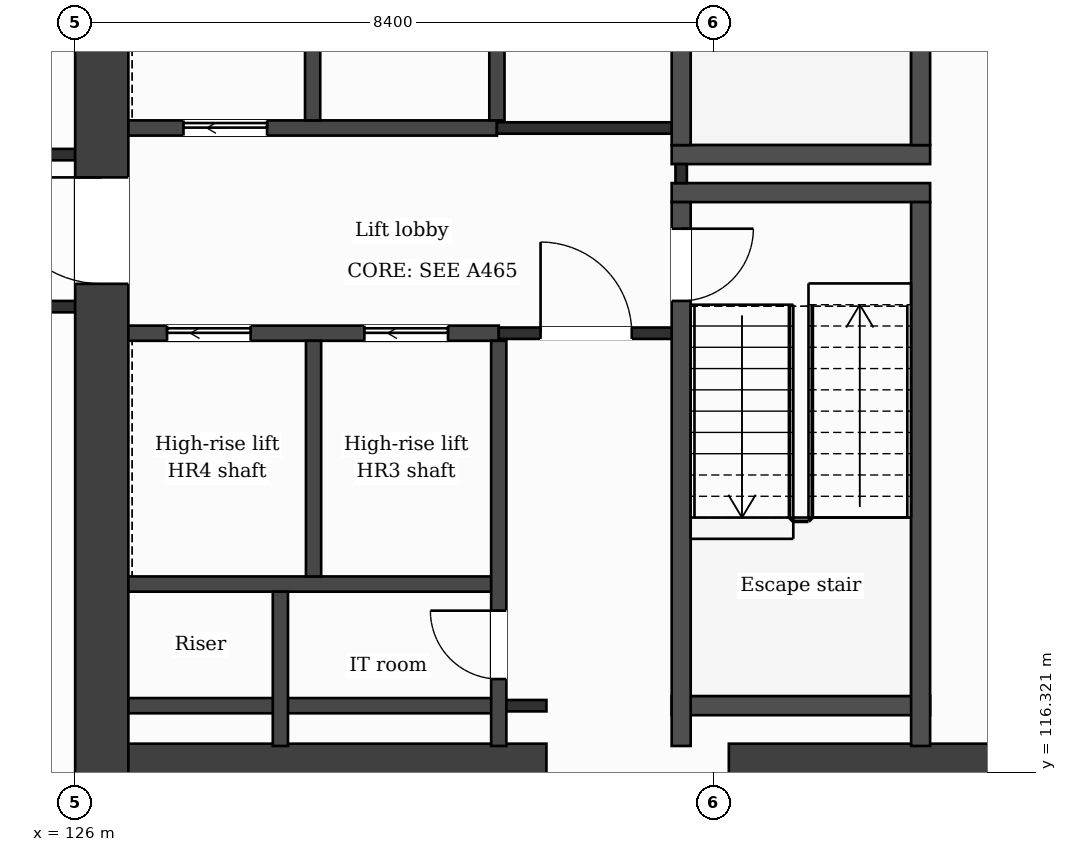
"""IFC4 building model, lengths in metres.
Left out: names, types, materials, properties, quantities, classifications, styles, units other than length and angle.
Written with IfcOpenShell. Run it as: python <this file> out.ifc"""

import sys

from ifc_helpers import new_model, si_unit, direction, frame, frame_2d, origin, place, context, subcontext, project, spatial, rectangle, extrude, element, fill, save


model = new_model("IFC4")
c1 = context("Model", 3, precision=1e-05, world=origin(), true_north=direction((0.0, 1.0)))
c2 = subcontext(c1, "Body", "Model", "MODEL_VIEW")
j1 = project(units=[si_unit("LENGTHUNIT", "METRE"), si_unit("PLANEANGLEUNIT", "RADIAN")], contexts=[c1])
p1 = place(None, origin())
s1 = spatial("IfcSite", under=j1, at=p1, CompositionType="ELEMENT")
p2 = place(p1, origin())
s2 = spatial("IfcBuilding", under=s1, at=p2, CompositionType="ELEMENT")
p3 = place(p2, frame((0.0, 0.0, 266.4)))
s3 = spatial("IfcBuildingStorey", under=s2, at=p3, CompositionType="ELEMENT", Elevation=266.4)
p4 = place(p3, frame((137.863, 132.05, 0.0), z_axis=(0.0, 0.0, 1.0), x_axis=(0.133406218907, -0.991061441464, 0.0)))
e1 = element("IfcWall", 1, at=p4, inside=s3, PredefinedType="SHEAR", context=c2, shape_type="SweptSolid", body=[
    extrude(rectangle(XDim=21.492, YDim=0.7, at=frame_2d((10.746, 0.0))), origin(), (0.0, 0.0, 1.0), 3.7),
])
p5 = place(p3, frame((126.35, 110.75, 0.0), z_axis=(0.0, 0.0, 1.0), x_axis=(0.0, 1.0, 0.0)))
e2 = element("IfcWall", 2, at=p5, inside=s3, PredefinedType="SHEAR", context=c2, shape_type="SweptSolid", body=[
    extrude(rectangle(XDim=21.3, YDim=0.7, at=frame_2d((10.65, 0.0))), origin(), (0.0, 0.0, 1.0), 3.7),
])
p6 = place(p5, frame((12.0, 0.0, 0.0)))
e3 = element("IfcOpeningElement", 3, at=p6, cuts=e2, PredefinedType="OPENING", context=c2, shape_type="SweptSolid", body=[
    extrude(rectangle(XDim=1.4, YDim=2.1, at=frame_2d((0.7, 1.05))), frame((0.0, 0.36, 0.0), z_axis=(0.0, -1.0, 0.0), x_axis=(1.0, 0.0, 0.0)), (0.0, 0.0, 1.0), 0.72),
])
p7 = place(p3, frame((126.7, 116.35, 0.0), z_axis=(0.0, 0.0, 1.0), x_axis=(1.0, 0.0, 0.0)))
e4 = element("IfcWall", 4, at=p7, inside=s3, PredefinedType="SHEAR", context=c2, shape_type="SweptSolid", body=[
    extrude(rectangle(XDim=5.5, YDim=0.7, at=frame_2d((2.75, 0.0))), origin(), (0.0, 0.0, 1.0), 3.7),
])
p8 = place(p3, frame((134.6, 116.35, 0.0), z_axis=(0.0, 0.0, 1.0), x_axis=(1.0, 0.0, 0.0)))
e5 = element("IfcWall", 5, at=p8, inside=s3, PredefinedType="SHEAR", context=c2, shape_type="SweptSolid", body=[
    extrude(rectangle(XDim=5.077, YDim=0.7, at=frame_2d((2.539, 0.0))), origin(), (0.0, 0.0, 1.0), 3.7),
])
p9 = place(p3, frame((126.7, 117.2, 0.0), z_axis=(0.0, 0.0, 1.0), x_axis=(1.0, 0.0, 0.0)))
e6 = element("IfcWall", 6, at=p9, inside=s3, PredefinedType="PARTITIONING", context=c2, shape_type="SweptSolid", body=[
    extrude(rectangle(XDim=4.873, YDim=0.2, at=frame_2d((2.437, 0.0))), origin(), (0.0, 0.0, 1.0), 3.38),
])
p10 = place(p3, frame((131.573, 117.2, 0.0), z_axis=(0.0, 0.0, 1.0), x_axis=(1.0, 0.0, 0.0)))
e7 = element("IfcWall", 7, at=p10, inside=s3, PredefinedType="PARTITIONING", context=c2, shape_type="SweptSolid", body=[
    extrude(rectangle(XDim=0.627, YDim=0.15, at=frame_2d((0.313, 0.0))), origin(), (0.0, 0.0, 1.0), 3.38),
])
p11 = place(p3, frame((133.848, 117.2, 0.0), z_axis=(0.0, 0.0, 1.0), x_axis=(1.0, 0.0, 0.0)))
e8 = element("IfcWall", 8, at=p11, inside=s3, PredefinedType="PARTITIONING", context=c2, shape_type="SweptSolid", body=[
    extrude(rectangle(XDim=3.4, YDim=0.25, at=frame_2d((1.7, 0.0))), origin(), (0.0, 0.0, 1.0), 3.38),
])
p12 = place(p3, frame((126.7, 118.8, 0.0), z_axis=(0.0, 0.0, 1.0), x_axis=(1.0, 0.0, 0.0)))
e9 = element("IfcWall", 9, at=p12, inside=s3, PredefinedType="PARTITIONING", context=c2, shape_type="SweptSolid", body=[
    extrude(rectangle(XDim=4.873, YDim=0.2, at=frame_2d((2.437, 0.0))), origin(), (0.0, 0.0, 1.0), 3.38),
])
p13 = place(p3, frame((126.7, 122.1, 0.0), z_axis=(0.0, 0.0, 1.0), x_axis=(1.0, 0.0, 0.0)))
e10 = element("IfcWall", 10, at=p13, inside=s3, PredefinedType="PARTITIONING", context=c2, shape_type="SweptSolid", body=[
    extrude(rectangle(XDim=4.873, YDim=0.2, at=frame_2d((2.437, 0.0))), origin(), (0.0, 0.0, 1.0), 3.38),
])
p14 = place(p13, frame((3.105, 0.0, 0.0)))
e11 = element("IfcOpeningElement", 11, at=p14, cuts=e10, PredefinedType="OPENING", context=c2, shape_type="SweptSolid", body=[
    extrude(rectangle(XDim=1.1, YDim=2.1, at=frame_2d((0.55, 1.05))), frame((0.0, 0.11, 0.0), z_axis=(0.0, -1.0, 0.0), x_axis=(1.0, 0.0, 0.0)), (0.0, 0.0, 1.0), 0.22),
])
p15 = place(p13, frame((0.509, 0.0, 0.0)))
e12 = element("IfcOpeningElement", 12, at=p15, cuts=e10, PredefinedType="OPENING", context=c2, shape_type="SweptSolid", body=[
    extrude(rectangle(XDim=1.1, YDim=2.1, at=frame_2d((0.55, 1.05))), frame((0.0, 0.11, 0.0), z_axis=(0.0, -1.0, 0.0), x_axis=(1.0, 0.0, 0.0)), (0.0, 0.0, 1.0), 0.22),
])
p16 = place(p3, frame((131.573, 122.1, 0.0), z_axis=(0.0, 0.0, 1.0), x_axis=(1.0, 0.0, 0.0)))
e13 = element("IfcWall", 13, at=p16, inside=s3, PredefinedType="PARTITIONING", context=c2, shape_type="SweptSolid", body=[
    extrude(rectangle(XDim=2.4, YDim=0.15, at=frame_2d((1.2, 0.0))), origin(), (0.0, 0.0, 1.0), 3.38),
])
p17 = place(p16, frame((0.55, 0.0, 0.0)))
e14 = element("IfcOpeningElement", 14, at=p17, cuts=e13, PredefinedType="OPENING", context=c2, shape_type="SweptSolid", body=[
    extrude(rectangle(XDim=1.2, YDim=2.1, at=frame_2d((0.6, 1.05))), frame((0.0, 0.085, 0.0), z_axis=(0.0, -1.0, 0.0), x_axis=(1.0, 0.0, 0.0)), (0.0, 0.0, 1.0), 0.17),
])
p18 = place(p3, frame((100.8, 122.45, 0.0), z_axis=(0.0, 0.0, 1.0), x_axis=(1.0, 0.0, 0.0)))
e15 = element("IfcWall", 15, at=p18, inside=s3, PredefinedType="PARTITIONING", context=c2, shape_type="SweptSolid", body=[
    extrude(rectangle(XDim=25.2, YDim=0.15, at=frame_2d((12.6, 0.0))), origin(), (0.0, 0.0, 1.0), 3.38),
])
p19 = place(p18, frame((5.55, 0.0, 0.0)))
e16 = element("IfcOpeningElement", 16, at=p19, cuts=e15, PredefinedType="OPENING", context=c2, shape_type="SweptSolid", body=[
    extrude(rectangle(XDim=1.0, YDim=2.1, at=frame_2d((0.5, 1.05))), frame((0.0, 0.085, 0.0), z_axis=(0.0, -1.0, 0.0), x_axis=(1.0, 0.0, 0.0)), (0.0, 0.0, 1.0), 0.17),
])
p20 = place(p18, frame((8.65, 0.0, 0.0)))
e17 = element("IfcOpeningElement", 17, at=p20, cuts=e15, PredefinedType="OPENING", context=c2, shape_type="SweptSolid", body=[
    extrude(rectangle(XDim=1.0, YDim=2.1, at=frame_2d((0.5, 1.05))), frame((0.0, 0.085, 0.0), z_axis=(0.0, -1.0, 0.0), x_axis=(1.0, 0.0, 0.0)), (0.0, 0.0, 1.0), 0.17),
])
p21 = place(p18, frame((19.83, 0.0, 0.0)))
e18 = element("IfcOpeningElement", 18, at=p21, cuts=e15, PredefinedType="OPENING", context=c2, shape_type="SweptSolid", body=[
    extrude(rectangle(XDim=1.0, YDim=2.1, at=frame_2d((0.5, 1.05))), frame((0.0, 0.085, 0.0), z_axis=(0.0, -1.0, 0.0), x_axis=(1.0, 0.0, 0.0)), (0.0, 0.0, 1.0), 0.17),
])
for number, where, z_axis, x_axis in (
    (19, (133.848, 123.95, 0.0), (0.0, 0.0, 1.0), (1.0, 0.0, 0.0)),
    (20, (133.848, 124.45, 0.0), (0.0, 0.0, 1.0), (1.0, 0.0, 0.0)),
):
    element("IfcWall", number, at=place(p3, frame(where, z_axis=z_axis, x_axis=x_axis)), inside=s3, PredefinedType="PARTITIONING", context=c2, shape_type="SweptSolid", body=[
        extrude(rectangle(XDim=3.4, YDim=0.25, at=frame_2d((1.7, 0.0))), origin(), (0.0, 0.0, 1.0), 3.38),
    ])
p22 = place(p3, frame((100.8, 124.45, 0.0), z_axis=(0.0, 0.0, 1.0), x_axis=(1.0, 0.0, 0.0)))
e21 = element("IfcWall", 21, at=p22, inside=s3, PredefinedType="PARTITIONING", context=c2, shape_type="SweptSolid", body=[
    extrude(rectangle(XDim=25.2, YDim=0.15, at=frame_2d((12.6, 0.0))), origin(), (0.0, 0.0, 1.0), 3.38),
])
p23 = place(p22, frame((0.975, 0.0, 0.0)))
e22 = element("IfcOpeningElement", 22, at=p23, cuts=e21, PredefinedType="OPENING", context=c2, shape_type="SweptSolid", body=[
    extrude(rectangle(XDim=1.0, YDim=2.1, at=frame_2d((0.5, 1.05))), frame((0.0, 0.085, 0.0), z_axis=(0.0, -1.0, 0.0), x_axis=(1.0, 0.0, 0.0)), (0.0, 0.0, 1.0), 0.17),
])
p24 = place(p22, frame((5.175, 0.0, 0.0)))
e23 = element("IfcOpeningElement", 23, at=p24, cuts=e21, PredefinedType="OPENING", context=c2, shape_type="SweptSolid", body=[
    extrude(rectangle(XDim=1.0, YDim=2.1, at=frame_2d((0.5, 1.05))), frame((0.0, 0.085, 0.0), z_axis=(0.0, -1.0, 0.0), x_axis=(1.0, 0.0, 0.0)), (0.0, 0.0, 1.0), 0.17),
])
p25 = place(p22, frame((13.775, 0.0, 0.0)))
e24 = element("IfcOpeningElement", 24, at=p25, cuts=e21, PredefinedType="OPENING", context=c2, shape_type="SweptSolid", body=[
    extrude(rectangle(XDim=1.0, YDim=2.1, at=frame_2d((0.5, 1.05))), frame((0.0, 0.085, 0.0), z_axis=(0.0, -1.0, 0.0), x_axis=(1.0, 0.0, 0.0)), (0.0, 0.0, 1.0), 0.17),
])
p26 = place(p22, frame((17.67, 0.0, 0.0)))
e25 = element("IfcOpeningElement", 25, at=p26, cuts=e21, PredefinedType="OPENING", context=c2, shape_type="SweptSolid", body=[
    extrude(rectangle(XDim=1.0, YDim=2.1, at=frame_2d((0.5, 1.05))), frame((0.0, 0.085, 0.0), z_axis=(0.0, -1.0, 0.0), x_axis=(1.0, 0.0, 0.0)), (0.0, 0.0, 1.0), 0.17),
])
p27 = place(p22, frame((23.225, 0.0, 0.0)))
e26 = element("IfcOpeningElement", 26, at=p27, cuts=e21, PredefinedType="OPENING", context=c2, shape_type="SweptSolid", body=[
    extrude(rectangle(XDim=1.0, YDim=2.1, at=frame_2d((0.5, 1.05))), frame((0.0, 0.085, 0.0), z_axis=(0.0, -1.0, 0.0), x_axis=(1.0, 0.0, 0.0)), (0.0, 0.0, 1.0), 0.17),
])
p28 = place(p3, frame((126.7, 124.8, 0.0), z_axis=(0.0, 0.0, 1.0), x_axis=(1.0, 0.0, 0.0)))
e27 = element("IfcWall", 27, at=p28, inside=s3, PredefinedType="PARTITIONING", context=c2, shape_type="SweptSolid", body=[
    extrude(rectangle(XDim=4.849, YDim=0.2, at=frame_2d((2.424, 0.0))), origin(), (0.0, 0.0, 1.0), 3.38),
])
p29 = place(p28, frame((0.725, 0.0, 0.0)))
e28 = element("IfcOpeningElement", 28, at=p29, cuts=e27, PredefinedType="OPENING", context=c2, shape_type="SweptSolid", body=[
    extrude(rectangle(XDim=1.1, YDim=2.1, at=frame_2d((0.55, 1.05))), frame((0.0, 0.11, 0.0), z_axis=(0.0, -1.0, 0.0), x_axis=(1.0, 0.0, 0.0)), (0.0, 0.0, 1.0), 0.22),
])
p30 = place(p3, frame((131.549, 124.8, 0.0), z_axis=(0.0, 0.0, 1.0), x_axis=(1.0, 0.0, 0.0)))
e29 = element("IfcWall", 29, at=p30, inside=s3, PredefinedType="PARTITIONING", context=c2, shape_type="SweptSolid", body=[
    extrude(rectangle(XDim=2.549, YDim=0.15, at=frame_2d((1.275, 0.0))), origin(), (0.0, 0.0, 1.0), 3.38),
])
p31 = place(p3, frame((128.7, 116.67, 0.0), z_axis=(0.0, 0.0, 1.0), x_axis=(0.0, 1.0, 0.0)))
e30 = element("IfcWall", 30, at=p31, inside=s3, PredefinedType="PARTITIONING", context=c2, shape_type="SweptSolid", body=[
    extrude(rectangle(XDim=2.03, YDim=0.2, at=frame_2d((1.015, 0.0))), origin(), (0.0, 0.0, 1.0), 3.38),
])
for number, where, z_axis, x_axis in (
    (31, (129.124, 124.9, 0.0), (0.0, 0.0, 1.0), (0.0, 1.0, 0.0)),
    (32, (129.136, 118.9, 0.0), (0.0, 0.0, 1.0), (0.0, 1.0, 0.0)),
    (33, (131.549, 124.9, 0.0), (0.0, 0.0, 1.0), (0.0, 1.0, 0.0)),
):
    element("IfcWall", number, at=place(p3, frame(where, z_axis=z_axis, x_axis=x_axis)), inside=s3, PredefinedType="PARTITIONING", context=c2, shape_type="SweptSolid", body=[
        extrude(rectangle(XDim=3.1, YDim=0.2, at=frame_2d((1.55, 0.0))), origin(), (0.0, 0.0, 1.0), 3.38),
    ])
p32 = place(p3, frame((131.573, 116.67, 0.0), z_axis=(0.0, 0.0, 1.0), x_axis=(0.0, 1.0, 0.0)))
e34 = element("IfcWall", 34, at=p32, inside=s3, PredefinedType="PARTITIONING", context=c2, shape_type="SweptSolid", body=[
    extrude(rectangle(XDim=5.33, YDim=0.2, at=frame_2d((2.665, 0.0))), origin(), (0.0, 0.0, 1.0), 3.38),
])
p33 = place(p32, frame((0.88, 0.0, 0.0)))
e35 = element("IfcOpeningElement", 35, at=p33, cuts=e34, PredefinedType="OPENING", context=c2, shape_type="SweptSolid", body=[
    extrude(rectangle(XDim=0.9, YDim=2.1, at=frame_2d((0.45, 1.05))), frame((0.0, 0.11, 0.0), z_axis=(0.0, -1.0, 0.0), x_axis=(1.0, 0.0, 0.0)), (0.0, 0.0, 1.0), 0.22),
])
p34 = place(p3, frame((133.973, 124.075, 0.0), z_axis=(0.0, 0.0, 1.0), x_axis=(0.0, 1.0, 0.0)))
e36 = element("IfcWall", 36, at=p34, inside=s3, PredefinedType="PARTITIONING", context=c2, shape_type="SweptSolid", body=[
    extrude(rectangle(XDim=0.25, YDim=0.15, at=frame_2d((0.125, 0.0))), origin(), (0.0, 0.0, 1.0), 3.38),
])
p35 = place(p3, frame((133.973, 116.67, 0.0), z_axis=(0.0, 0.0, 1.0), x_axis=(0.0, 1.0, 0.0)))
e37 = element("IfcWall", 37, at=p35, inside=s3, PredefinedType="PARTITIONING", context=c2, shape_type="SweptSolid", body=[
    extrude(rectangle(XDim=7.155, YDim=0.25, at=frame_2d((3.578, 0.0))), origin(), (0.0, 0.0, 1.0), 3.38),
])
p36 = place(p35, frame((5.855, 0.0, 0.0)))
e38 = element("IfcOpeningElement", 38, at=p36, cuts=e37, PredefinedType="OPENING", context=c2, shape_type="SweptSolid", body=[
    extrude(rectangle(XDim=0.95, YDim=2.1, at=frame_2d((0.475, 1.05))), frame((0.0, 0.135, 0.0), z_axis=(0.0, -1.0, 0.0), x_axis=(1.0, 0.0, 0.0)), (0.0, 0.0, 1.0), 0.27),
])
p37 = place(p3, frame((133.973, 124.575, 0.0), z_axis=(0.0, 0.0, 1.0), x_axis=(0.0, 1.0, 0.0)))
e39 = element("IfcWall", 39, at=p37, inside=s3, PredefinedType="PARTITIONING", context=c2, shape_type="SweptSolid", body=[
    extrude(rectangle(XDim=7.155, YDim=0.25, at=frame_2d((3.578, 0.0))), origin(), (0.0, 0.0, 1.0), 3.38),
])
p38 = place(p37, frame((5.325, 0.0, 0.0)))
e40 = element("IfcOpeningElement", 40, at=p38, cuts=e39, PredefinedType="OPENING", context=c2, shape_type="SweptSolid", body=[
    extrude(rectangle(XDim=1.0, YDim=2.1, at=frame_2d((0.5, 1.05))), frame((0.0, 0.135, 0.0), z_axis=(0.0, -1.0, 0.0), x_axis=(1.0, 0.0, 0.0)), (0.0, 0.0, 1.0), 0.27),
])
for number, where, z_axis, x_axis in (
    (41, (137.123, 116.67, 0.0), (0.0, 0.0, 1.0), (0.0, 1.0, 0.0)),
    (42, (137.123, 124.575, 0.0), (0.0, 0.0, 1.0), (0.0, 1.0, 0.0)),
):
    element("IfcWall", number, at=place(p3, frame(where, z_axis=z_axis, x_axis=x_axis)), inside=s3, PredefinedType="PARTITIONING", context=c2, shape_type="SweptSolid", body=[
        extrude(rectangle(XDim=7.155, YDim=0.25, at=frame_2d((3.578, 0.0))), origin(), (0.0, 0.0, 1.0), 3.38),
    ])
p39 = place(p17, origin())
e43 = element("IfcDoor", 43, at=p39, inside=s3, OperationType="SINGLE_SWING_LEFT", PredefinedType="DOOR", context=c2, shape_type="SweptSolid", body=[
    extrude(rectangle(XDim=1.2, YDim=2.1, at=frame_2d((0.6, 1.05))), frame((0.0, 0.025, 0.0), z_axis=(0.0, -1.0, 0.0), x_axis=(1.0, 0.0, 0.0)), (0.0, 0.0, 1.0), 0.05),
])
fill(e14, e43)
p40 = place(p14, origin())
e44 = element("IfcDoor", 44, at=p40, inside=s3, OperationType="SLIDING_TO_LEFT", PredefinedType="DOOR", context=c2, shape_type="SweptSolid", body=[
    extrude(rectangle(XDim=1.1, YDim=2.1, at=frame_2d((0.55, 1.05))), frame((0.0, 0.025, 0.0), z_axis=(0.0, -1.0, 0.0), x_axis=(1.0, 0.0, 0.0)), (0.0, 0.0, 1.0), 0.05),
])
fill(e11, e44)
p41 = place(p15, origin())
e45 = element("IfcDoor", 45, at=p41, inside=s3, OperationType="SLIDING_TO_LEFT", PredefinedType="DOOR", context=c2, shape_type="SweptSolid", body=[
    extrude(rectangle(XDim=1.1, YDim=2.1, at=frame_2d((0.55, 1.05))), frame((0.0, 0.025, 0.0), z_axis=(0.0, -1.0, 0.0), x_axis=(1.0, 0.0, 0.0)), (0.0, 0.0, 1.0), 0.05),
])
fill(e12, e45)
p42 = place(p29, origin())
e46 = element("IfcDoor", 46, at=p42, inside=s3, OperationType="SLIDING_TO_LEFT", PredefinedType="DOOR", context=c2, shape_type="SweptSolid", body=[
    extrude(rectangle(XDim=1.1, YDim=2.1, at=frame_2d((0.55, 1.05))), frame((0.0, 0.025, 0.0), z_axis=(0.0, -1.0, 0.0), x_axis=(1.0, 0.0, 0.0)), (0.0, 0.0, 1.0), 0.05),
])
fill(e28, e46)
p43 = place(p36, origin())
e47 = element("IfcDoor", 47, at=p43, inside=s3, OperationType="SINGLE_SWING_RIGHT", PredefinedType="DOOR", context=c2, shape_type="SweptSolid", body=[
    extrude(rectangle(XDim=0.95, YDim=2.1, at=frame_2d((0.475, 1.05))), frame((0.0, 0.025, 0.0), z_axis=(0.0, -1.0, 0.0), x_axis=(1.0, 0.0, 0.0)), (0.0, 0.0, 1.0), 0.05),
])
fill(e38, e47)
p44 = place(p33, origin())
e48 = element("IfcDoor", 48, at=p44, inside=s3, OperationType="SINGLE_SWING_RIGHT", PredefinedType="DOOR", context=c2, shape_type="SweptSolid", body=[
    extrude(rectangle(XDim=0.9, YDim=2.1, at=frame_2d((0.45, 1.05))), frame((0.0, 0.025, 0.0), z_axis=(0.0, -1.0, 0.0), x_axis=(1.0, 0.0, 0.0)), (0.0, 0.0, 1.0), 0.05),
])
fill(e35, e48)
p45 = place(p6, origin())
e49 = element("IfcDoor", 49, at=p45, inside=s3, OperationType="SINGLE_SWING_RIGHT", PredefinedType="DOOR", context=c2, shape_type="SweptSolid", body=[
    extrude(rectangle(XDim=1.4, YDim=2.1, at=frame_2d((0.7, 1.05))), frame((0.0, 0.025, 0.0), z_axis=(0.0, -1.0, 0.0), x_axis=(1.0, 0.0, 0.0)), (0.0, 0.0, 1.0), 0.05),
])
fill(e3, e49)
save(model, sys.argv[1])
